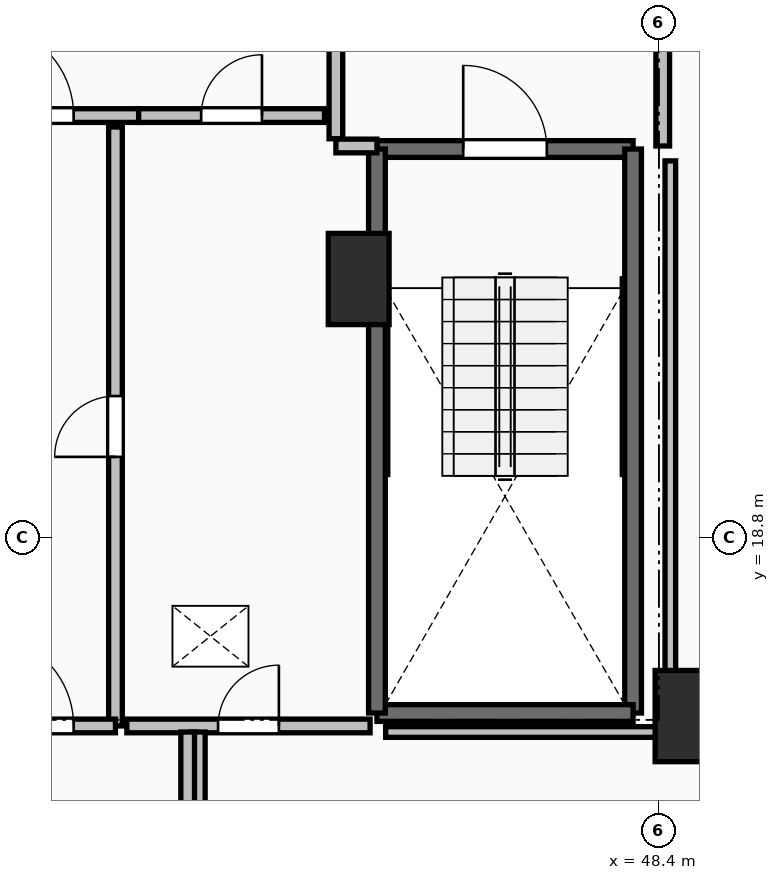
"""IFC4 building model, lengths in metres.
Left out: names, types, materials, properties, quantities, classifications, styles, units other than length and angle.
Written with IfcOpenShell. Run it as: python <this file> out.ifc"""

import sys

from ifc_helpers import new_model, si_unit, direction, frame, frame_2d, origin, origin_2d, place, context, subcontext, project, spatial, rectangle, extrude, element, fill, save


model = new_model("IFC4")
c1 = context("Model", 3, precision=1e-05, world=origin(), true_north=direction((0.0, 1.0)))
c2 = subcontext(c1, "Body", "Model", "MODEL_VIEW")
j1 = project(units=[si_unit("LENGTHUNIT", "METRE"), si_unit("PLANEANGLEUNIT", "RADIAN")], contexts=[c1])
p1 = place(None, origin())
s1 = spatial("IfcSite", under=j1, at=p1, CompositionType="ELEMENT")
p2 = place(p1, origin())
s2 = spatial("IfcBuilding", under=s1, at=p2, CompositionType="ELEMENT")
p3 = place(p2, frame((0.0, 0.0, 55.5)))
s3 = spatial("IfcBuildingStorey", under=s2, at=p3, CompositionType="ELEMENT", Elevation=55.5)
for number, where, z_axis, x_axis in (
    (1, (48.75, 16.45, 0.0), (0.0, 0.0, 1.0), (1.0, 0.0, 0.0)),
    (2, (44.45, 22.2, 0.0), (0.0, 0.0, 1.0), (1.0, 0.0, 0.0)),
):
    element("IfcColumn", number, at=place(p3, frame(where, z_axis=z_axis, x_axis=x_axis)), inside=s3, PredefinedType="PILASTER", context=c2, shape_type="SweptSolid", body=[
        extrude(rectangle(XDim=0.8, YDim=1.2, at=origin_2d()), origin(), (0.0, 0.0, 1.0), 3.5),
    ])
p4 = place(p3, frame((44.69, 23.91, 0.0), z_axis=(0.0, 0.0, 1.0), x_axis=(1.0, 0.0, 0.0)))
e3 = element("IfcWall", 3, at=p4, inside=s3, PredefinedType="SOLIDWALL", context=c2, shape_type="SweptSolid", body=[
    extrude(rectangle(XDim=3.37, YDim=0.22, at=frame_2d((1.685, 0.0))), origin(), (0.0, 0.0, 1.0), 3.24),
])
p5 = place(p4, frame((1.135, 0.0, 0.0)))
e4 = element("IfcOpeningElement", 4, at=p5, cuts=e3, PredefinedType="OPENING", context=c2, shape_type="SweptSolid", body=[
    extrude(rectangle(XDim=1.1, YDim=2.15, at=frame_2d((0.55, 1.075))), frame((0.0, 0.125, 0.0), z_axis=(0.0, -1.0, 0.0), x_axis=(1.0, 0.0, 0.0)), (0.0, 0.0, 1.0), 0.25),
])
p6 = place(p3, frame((48.06, 23.91, 0.0), z_axis=(0.0, 0.0, 1.0), x_axis=(0.0, -1.0, 0.0)))
e5 = element("IfcWall", 5, at=p6, inside=s3, PredefinedType="SOLIDWALL", context=c2, shape_type="SweptSolid", body=[
    extrude(rectangle(XDim=7.42, YDim=0.22, at=frame_2d((3.71, 0.0))), origin(), (0.0, 0.0, 1.0), 3.24),
])
p7 = place(p3, frame((48.06, 16.49, 0.0), z_axis=(0.0, 0.0, 1.0), x_axis=(-1.0, 0.0, 0.0)))
e6 = element("IfcWall", 6, at=p7, inside=s3, PredefinedType="SOLIDWALL", context=c2, shape_type="SweptSolid", body=[
    extrude(rectangle(XDim=3.37, YDim=0.22, at=frame_2d((1.685, 0.0))), origin(), (0.0, 0.0, 1.0), 3.24),
])
p8 = place(p3, frame((44.69, 16.49, 0.0), z_axis=(0.0, 0.0, 1.0), x_axis=(0.0, 1.0, 0.0)))
e7 = element("IfcWall", 7, at=p8, inside=s3, PredefinedType="SOLIDWALL", context=c2, shape_type="SweptSolid", body=[
    extrude(rectangle(XDim=7.42, YDim=0.22, at=frame_2d((3.71, 0.0))), origin(), (0.0, 0.0, 1.0), 3.24),
])
p9 = place(p3, frame((44.15, 27.955, 0.0), z_axis=(0.0, 0.0, 1.0), x_axis=(0.0, -1.0, 0.0)))
e8 = element("IfcWall", 8, at=p9, inside=s3, PredefinedType="PARTITIONING", context=c2, shape_type="SweptSolid", body=[
    extrude(rectangle(XDim=3.91, YDim=0.18, at=frame_2d((1.955, 0.0))), origin(), (0.0, 0.0, 1.0), 3.24),
])
p10 = place(p9, frame((1.355, 0.0, 0.0)))
e9 = element("IfcOpeningElement", 9, at=p10, cuts=e8, PredefinedType="OPENING", context=c2, shape_type="SweptSolid", body=[
    extrude(rectangle(XDim=1.2, YDim=2.15, at=frame_2d((0.6, 1.075))), frame((0.0, 0.105, 0.0), z_axis=(0.0, -1.0, 0.0), x_axis=(1.0, 0.0, 0.0)), (0.0, 0.0, 1.0), 0.21),
])
p11 = place(p3, frame((44.15, 23.95, 0.0), z_axis=(0.0, 0.0, 1.0), x_axis=(1.0, 0.0, 0.0)))
e10 = element("IfcWall", 10, at=p11, inside=s3, PredefinedType="PARTITIONING", context=c2, shape_type="SweptSolid", body=[
    extrude(rectangle(XDim=0.54, YDim=0.18, at=frame_2d((0.27, 0.0))), origin(), (0.0, 0.0, 1.0), 3.24),
])
p12 = place(p3, frame((48.45, 23.95, 0.0), z_axis=(0.0, 0.0, 1.0), x_axis=(0.0, 1.0, 0.0)))
e11 = element("IfcWall", 11, at=p12, inside=s3, PredefinedType="PARTITIONING", context=c2, shape_type="SweptSolid", body=[
    extrude(rectangle(XDim=4.05, YDim=0.18, at=frame_2d((2.025, 0.0))), origin(), (0.0, 0.0, 1.0), 3.24),
])
p13 = place(p12, frame((1.425, 0.0, 0.0)))
e12 = element("IfcOpeningElement", 12, at=p13, cuts=e11, PredefinedType="OPENING", context=c2, shape_type="SweptSolid", body=[
    extrude(rectangle(XDim=1.2, YDim=2.15, at=frame_2d((0.6, 1.075))), frame((0.0, 0.105, 0.0), z_axis=(0.0, -1.0, 0.0), x_axis=(1.0, 0.0, 0.0)), (0.0, 0.0, 1.0), 0.21),
])
p14 = place(p3, frame((38.645, 24.35, 0.0), z_axis=(0.0, 0.0, 1.0), x_axis=(1.0, 0.0, 0.0)))
e13 = element("IfcWall", 13, at=p14, inside=s3, PredefinedType="PARTITIONING", context=c2, shape_type="SweptSolid", body=[
    extrude(rectangle(XDim=2.91, YDim=0.18, at=frame_2d((1.455, 0.0))), origin(), (0.0, 0.0, 1.0), 3.24),
])
p15 = place(p14, frame((0.855, 0.0, 0.0)))
e14 = element("IfcOpeningElement", 14, at=p15, cuts=e13, PredefinedType="OPENING", context=c2, shape_type="SweptSolid", body=[
    extrude(rectangle(XDim=1.2, YDim=2.15, at=frame_2d((0.6, 1.075))), frame((0.0, 0.105, 0.0), z_axis=(0.0, -1.0, 0.0), x_axis=(1.0, 0.0, 0.0)), (0.0, 0.0, 1.0), 0.21),
])
p16 = place(p3, frame((41.555, 24.35, 0.0), z_axis=(0.0, 0.0, 1.0), x_axis=(1.0, 0.0, 0.0)))
e15 = element("IfcWall", 15, at=p16, inside=s3, PredefinedType="PARTITIONING", context=c2, shape_type="SweptSolid", body=[
    extrude(rectangle(XDim=2.445, YDim=0.18, at=frame_2d((1.223, 0.0))), origin(), (0.0, 0.0, 1.0), 3.24),
])
p17 = place(p16, frame((0.823, 0.0, 0.0)))
e16 = element("IfcOpeningElement", 16, at=p17, cuts=e15, PredefinedType="OPENING", context=c2, shape_type="SweptSolid", body=[
    extrude(rectangle(XDim=0.8, YDim=2.05, at=frame_2d((0.4, 1.025))), frame((0.0, 0.105, 0.0), z_axis=(0.0, -1.0, 0.0), x_axis=(1.0, 0.0, 0.0)), (0.0, 0.0, 1.0), 0.21),
])
p18 = place(p3, frame((41.25, 16.32, 0.0), z_axis=(0.0, 0.0, 1.0), x_axis=(0.0, 1.0, 0.0)))
e17 = element("IfcWall", 17, at=p18, inside=s3, PredefinedType="PARTITIONING", context=c2, shape_type="SweptSolid", body=[
    extrude(rectangle(XDim=7.88, YDim=0.18, at=frame_2d((3.94, 0.0))), origin(), (0.0, 0.0, 1.0), 3.24),
])
p19 = place(p18, frame((3.54, 0.0, 0.0)))
e18 = element("IfcOpeningElement", 18, at=p19, cuts=e17, PredefinedType="OPENING", context=c2, shape_type="SweptSolid", body=[
    extrude(rectangle(XDim=0.8, YDim=2.05, at=frame_2d((0.4, 1.025))), frame((0.0, 0.105, 0.0), z_axis=(0.0, -1.0, 0.0), x_axis=(1.0, 0.0, 0.0)), (0.0, 0.0, 1.0), 0.21),
])
p20 = place(p3, frame((38.95, 16.32, 0.0), z_axis=(0.0, 0.0, 1.0), x_axis=(1.0, 0.0, 0.0)))
e19 = element("IfcWall", 19, at=p20, inside=s3, PredefinedType="PARTITIONING", context=c2, shape_type="SweptSolid", body=[
    extrude(rectangle(XDim=2.3, YDim=0.18, at=frame_2d((1.15, 0.0))), origin(), (0.0, 0.0, 1.0), 3.24),
])
p21 = place(p20, frame((0.55, 0.0, 0.0)))
e20 = element("IfcOpeningElement", 20, at=p21, cuts=e19, PredefinedType="OPENING", context=c2, shape_type="SweptSolid", body=[
    extrude(rectangle(XDim=1.2, YDim=2.15, at=frame_2d((0.6, 1.075))), frame((0.0, 0.105, 0.0), z_axis=(0.0, -1.0, 0.0), x_axis=(1.0, 0.0, 0.0)), (0.0, 0.0, 1.0), 0.21),
])
p22 = place(p3, frame((41.4, 16.32, 0.0), z_axis=(0.0, 0.0, 1.0), x_axis=(1.0, 0.0, 0.0)))
e21 = element("IfcWall", 21, at=p22, inside=s3, PredefinedType="PARTITIONING", context=c2, shape_type="SweptSolid", body=[
    extrude(rectangle(XDim=3.2, YDim=0.18, at=frame_2d((1.6, 0.0))), origin(), (0.0, 0.0, 1.0), 3.24),
])
p23 = place(p22, frame((1.2, 0.0, 0.0)))
e22 = element("IfcOpeningElement", 22, at=p23, cuts=e21, PredefinedType="OPENING", context=c2, shape_type="SweptSolid", body=[
    extrude(rectangle(XDim=0.8, YDim=2.05, at=frame_2d((0.4, 1.025))), frame((0.0, 0.105, 0.0), z_axis=(0.0, -1.0, 0.0), x_axis=(1.0, 0.0, 0.0)), (0.0, 0.0, 1.0), 0.21),
])
for number, where, z_axis, x_axis in (
    (23, (42.34, 16.24, 0.0), (0.0, 0.0, 1.0), (0.0, -1.0, 0.0)),
    (24, (42.2, 14.1, 0.0), (0.0, 0.0, 1.0), (0.0, 1.0, 0.0)),
):
    element("IfcWall", number, at=place(p3, frame(where, z_axis=z_axis, x_axis=x_axis)), inside=s3, PredefinedType="PARTITIONING", context=c2, shape_type="SweptSolid", body=[
        extrude(rectangle(XDim=2.14, YDim=0.18, at=frame_2d((1.07, 0.0))), origin(), (0.0, 0.0, 1.0), 3.24),
    ])
p24 = place(p3, frame((48.55, 23.754, 0.0), z_axis=(0.0, 0.0, 1.0), x_axis=(0.0, -1.0, 0.0)))
e25 = element("IfcWall", 25, at=p24, inside=s3, PredefinedType="PARTITIONING", context=c2, shape_type="SweptSolid", body=[
    extrude(rectangle(XDim=7.514, YDim=0.14, at=frame_2d((3.757, 0.0))), origin(), (0.0, 0.0, 1.0), 2.432),
])
p25 = place(p3, frame((48.55, 16.24, 0.0), z_axis=(0.0, 0.0, 1.0), x_axis=(-1.0, 0.0, 0.0)))
e26 = element("IfcWall", 26, at=p25, inside=s3, PredefinedType="PARTITIONING", context=c2, shape_type="SweptSolid", body=[
    extrude(rectangle(XDim=3.745, YDim=0.14, at=frame_2d((1.873, 0.0))), origin(), (0.0, 0.0, 1.0), 2.432),
])
p26 = place(p5, origin())
e27 = element("IfcDoor", 27, at=p26, inside=s3, OperationType="SINGLE_SWING_LEFT", PredefinedType="DOOR", context=c2, shape_type="SweptSolid", body=[
    extrude(rectangle(XDim=1.1, YDim=2.15, at=frame_2d((0.55, 1.075))), frame((0.0, 0.025, 0.0), z_axis=(0.0, -1.0, 0.0), x_axis=(1.0, 0.0, 0.0)), (0.0, 0.0, 1.0), 0.05),
])
fill(e4, e27)
p27 = place(p15, origin())
e28 = element("IfcDoor", 28, at=p27, inside=s3, OperationType="SINGLE_SWING_LEFT", PredefinedType="DOOR", context=c2, shape_type="SweptSolid", body=[
    extrude(rectangle(XDim=1.2, YDim=2.15, at=frame_2d((0.6, 1.075))), frame((0.0, 0.025, 0.0), z_axis=(0.0, -1.0, 0.0), x_axis=(1.0, 0.0, 0.0)), (0.0, 0.0, 1.0), 0.05),
])
fill(e14, e28)
p28 = place(p17, origin())
e29 = element("IfcDoor", 29, at=p28, inside=s3, OperationType="SINGLE_SWING_RIGHT", PredefinedType="DOOR", context=c2, shape_type="SweptSolid", body=[
    extrude(rectangle(XDim=0.8, YDim=2.05, at=frame_2d((0.4, 1.025))), frame((0.0, 0.025, 0.0), z_axis=(0.0, -1.0, 0.0), x_axis=(1.0, 0.0, 0.0)), (0.0, 0.0, 1.0), 0.05),
])
fill(e16, e29)
p29 = place(p19, origin())
e30 = element("IfcDoor", 30, at=p29, inside=s3, OperationType="SINGLE_SWING_LEFT", PredefinedType="DOOR", context=c2, shape_type="SweptSolid", body=[
    extrude(rectangle(XDim=0.8, YDim=2.05, at=frame_2d((0.4, 1.025))), frame((0.0, 0.025, 0.0), z_axis=(0.0, -1.0, 0.0), x_axis=(1.0, 0.0, 0.0)), (0.0, 0.0, 1.0), 0.05),
])
fill(e18, e30)
p30 = place(p21, origin())
e31 = element("IfcDoor", 31, at=p30, inside=s3, OperationType="SINGLE_SWING_LEFT", PredefinedType="DOOR", context=c2, shape_type="SweptSolid", body=[
    extrude(rectangle(XDim=1.2, YDim=2.15, at=frame_2d((0.6, 1.075))), frame((0.0, 0.025, 0.0), z_axis=(0.0, -1.0, 0.0), x_axis=(1.0, 0.0, 0.0)), (0.0, 0.0, 1.0), 0.05),
])
fill(e20, e31)
p31 = place(p23, origin())
e32 = element("IfcDoor", 32, at=p31, inside=s3, OperationType="SINGLE_SWING_RIGHT", PredefinedType="DOOR", context=c2, shape_type="SweptSolid", body=[
    extrude(rectangle(XDim=0.8, YDim=2.05, at=frame_2d((0.4, 1.025))), frame((0.0, 0.025, 0.0), z_axis=(0.0, -1.0, 0.0), x_axis=(1.0, 0.0, 0.0)), (0.0, 0.0, 1.0), 0.05),
])
fill(e22, e32)
save(model, sys.argv[1])
